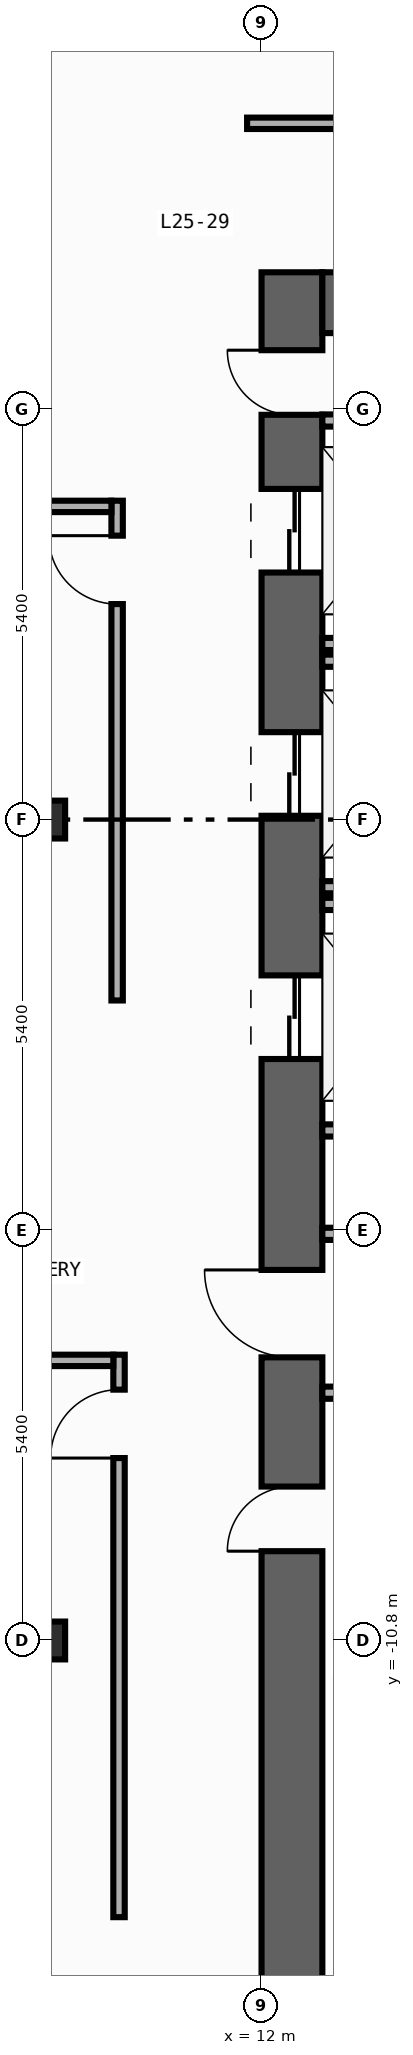
"""IFC4 building model, lengths in metres.
Left out: names, types, materials, properties, quantities, classifications, styles, units other than length and angle.
Written with IfcOpenShell. Run it as: python <this file> out.ifc"""

import sys

from ifc_helpers import new_model, si_unit, direction, frame, frame_2d, origin, origin_2d, place, context, subcontext, project, spatial, rectangle, i_section, extrude, element, fill, save


model = new_model("IFC4")
c1 = context("Model", 3, precision=1e-05, world=origin(), true_north=direction((0.0, 1.0)))
c2 = subcontext(c1, "Body", "Model", "MODEL_VIEW")
j1 = project(units=[si_unit("LENGTHUNIT", "METRE"), si_unit("PLANEANGLEUNIT", "RADIAN")], contexts=[c1])
p1 = place(None, origin())
s1 = spatial("IfcSite", under=j1, at=p1, CompositionType="ELEMENT")
p2 = place(p1, origin())
s2 = spatial("IfcBuilding", under=s1, at=p2, CompositionType="ELEMENT")
p3 = place(p2, frame((0.0, 0.0, 110.0)))
s3 = spatial("IfcBuildingStorey", under=s2, at=p3, CompositionType="ELEMENT", Elevation=110.0)
p4 = place(p3, frame((12.4, -19.8, 0.0), z_axis=(0.0, 0.0, 1.0), x_axis=(0.0, 1.0, 0.0)))
e1 = element("IfcWall", 1, at=p4, inside=s3, PredefinedType="SHEAR", context=c2, shape_type="SweptSolid", body=[
    extrude(rectangle(XDim=27.0, YDim=0.8, at=frame_2d((13.5, 0.0))), origin(), (0.0, 0.0, 1.0), 3.94),
])
p5 = place(p4, frame((23.05, 0.0, 0.0)))
e2 = element("IfcOpeningElement", 2, at=p5, cuts=e1, PredefinedType="OPENING", context=c2, shape_type="SweptSolid", body=[
    extrude(rectangle(XDim=1.1, YDim=2.2, at=frame_2d((0.55, 1.1))), frame((0.0, 0.41, 0.0), z_axis=(0.0, -1.0, 0.0), x_axis=(1.0, 0.0, 0.0)), (0.0, 0.0, 1.0), 0.82),
])
p6 = place(p4, frame((19.85, 0.0, 0.0)))
e3 = element("IfcOpeningElement", 3, at=p6, cuts=e1, PredefinedType="OPENING", context=c2, shape_type="SweptSolid", body=[
    extrude(rectangle(XDim=1.1, YDim=2.2, at=frame_2d((0.55, 1.1))), frame((0.0, 0.41, 0.0), z_axis=(0.0, -1.0, 0.0), x_axis=(1.0, 0.0, 0.0)), (0.0, 0.0, 1.0), 0.82),
])
p7 = place(p4, frame((16.65, 0.0, 0.0)))
e4 = element("IfcOpeningElement", 4, at=p7, cuts=e1, PredefinedType="OPENING", context=c2, shape_type="SweptSolid", body=[
    extrude(rectangle(XDim=1.1, YDim=2.2, at=frame_2d((0.55, 1.1))), frame((0.0, 0.41, 0.0), z_axis=(0.0, -1.0, 0.0), x_axis=(1.0, 0.0, 0.0)), (0.0, 0.0, 1.0), 0.82),
])
p8 = place(p4, frame((10.175, 0.0, 0.0)))
e5 = element("IfcOpeningElement", 5, at=p8, cuts=e1, PredefinedType="OPENING", context=c2, shape_type="SweptSolid", body=[
    extrude(rectangle(XDim=0.85, YDim=2.1, at=frame_2d((0.425, 1.05))), frame((0.0, 0.41, 0.0), z_axis=(0.0, -1.0, 0.0), x_axis=(1.0, 0.0, 0.0)), (0.0, 0.0, 1.0), 0.82),
])
p9 = place(p4, frame((12.725, 0.0, 0.0)))
e6 = element("IfcOpeningElement", 6, at=p9, cuts=e1, PredefinedType="OPENING", context=c2, shape_type="SweptSolid", body=[
    extrude(rectangle(XDim=1.15, YDim=2.2, at=frame_2d((0.575, 1.1))), frame((0.0, 0.41, 0.0), z_axis=(0.0, -1.0, 0.0), x_axis=(1.0, 0.0, 0.0)), (0.0, 0.0, 1.0), 0.82),
])
p10 = place(p4, frame((25.125, 0.0, 0.0)))
e7 = element("IfcOpeningElement", 7, at=p10, cuts=e1, PredefinedType="OPENING", context=c2, shape_type="SweptSolid", body=[
    extrude(rectangle(XDim=0.85, YDim=2.1, at=frame_2d((0.425, 1.05))), frame((0.0, 0.41, 0.0), z_axis=(0.0, -1.0, 0.0), x_axis=(1.0, 0.0, 0.0)), (0.0, 0.0, 1.0), 0.82),
])
p11 = place(p3, frame((12.8, 6.8, 0.0), z_axis=(0.0, 0.0, 1.0), x_axis=(1.0, 0.0, 0.0)))
e8 = element("IfcWall", 8, at=p11, inside=s3, PredefinedType="SHEAR", context=c2, shape_type="SweptSolid", body=[
    extrude(rectangle(XDim=6.8, YDim=0.8, at=frame_2d((3.4, 0.0))), origin(), (0.0, 0.0, 1.0), 3.94),
])
for number, where, z_axis, x_axis in (
    (9, (9.2, -10.8, 0.0), (0.0, 0.0, 1.0), (1.0, 0.0, 0.0)),
    (10, (9.2, 0.0, 0.0), (0.0, 0.0, 1.0), (1.0, 0.0, 0.0)),
):
    element("IfcColumn", number, at=place(p3, frame(where, z_axis=z_axis, x_axis=x_axis)), inside=s3, PredefinedType="COLUMN", context=c2, shape_type="SweptSolid", body=[
        extrude(i_section(OverallWidth=0.432, OverallDepth=0.498, WebThickness=0.045, FlangeThickness=0.07, FilletRadius=0.022, at=origin_2d()), origin(), (0.0, 0.0, 1.0), 4.2),
    ])
for number, where, z_axis, x_axis in (
    (11, (12.8, 2.31, 0.0), (0.0, 0.0, 1.0), (1.0, 0.0, 0.0)),
    (12, (12.8, -0.89, 0.0), (0.0, 0.0, 1.0), (1.0, 0.0, 0.0)),
    (13, (12.8, 2.09, 0.0), (0.0, 0.0, 1.0), (1.0, 0.0, 0.0)),
    (14, (12.8, -4.09, 0.0), (0.0, 0.0, 1.0), (1.0, 0.0, 0.0)),
    (15, (12.8, -1.11, 0.0), (0.0, 0.0, 1.0), (1.0, 0.0, 0.0)),
):
    element("IfcWall", number, at=place(p3, frame(where, z_axis=z_axis, x_axis=x_axis)), inside=s3, PredefinedType="STANDARD", context=c2, shape_type="SweptSolid", body=[
        extrude(rectangle(XDim=2.19, YDim=0.16, at=frame_2d((1.095, 0.0))), origin(), (0.0, 0.0, 1.0), 3.94),
    ])
for number, where, z_axis, x_axis in (
    (16, (12.8, -5.45, 0.0), (0.0, 0.0, 1.0), (1.0, 0.0, 0.0)),
    (17, (12.8, -7.54, 0.0), (0.0, 0.0, 1.0), (1.0, 0.0, 0.0)),
    (18, (12.8, 5.25, 0.0), (0.0, 0.0, 1.0), (1.0, 0.0, 0.0)),
):
    element("IfcWall", number, at=place(p3, frame(where, z_axis=z_axis, x_axis=x_axis)), inside=s3, PredefinedType="STANDARD", context=c2, shape_type="SweptSolid", body=[
        extrude(rectangle(XDim=2.6, YDim=0.16, at=frame_2d((1.3, 0.0))), origin(), (0.0, 0.0, 1.0), 3.94),
    ])
p12 = place(p3, frame((10.1, -2.38, 0.0), z_axis=(0.0, 0.0, 1.0), x_axis=(0.0, 1.0, 0.0)))
e19 = element("IfcWall", 19, at=p12, inside=s3, PredefinedType="PARTITIONING", context=c2, shape_type="SweptSolid", body=[
    extrude(rectangle(XDim=6.575, YDim=0.15, at=frame_2d((3.288, 0.0))), origin(), (0.0, 0.0, 1.0), 3.94),
])
p13 = place(p12, frame((5.215, 0.0, 0.0)))
e20 = element("IfcOpeningElement", 20, at=p13, cuts=e19, PredefinedType="OPENING", context=c2, shape_type="SweptSolid", body=[
    extrude(rectangle(XDim=0.9, YDim=2.15, at=frame_2d((0.45, 1.075))), frame((0.0, 0.085, 0.0), z_axis=(0.0, -1.0, 0.0), x_axis=(1.0, 0.0, 0.0)), (0.0, 0.0, 1.0), 0.17),
])
p14 = place(p3, frame((10.125, -14.44, 0.0), z_axis=(0.0, 0.0, 1.0), x_axis=(0.0, 1.0, 0.0)))
e21 = element("IfcWall", 21, at=p14, inside=s3, PredefinedType="PARTITIONING", context=c2, shape_type="SweptSolid", body=[
    extrude(rectangle(XDim=7.4, YDim=0.15, at=frame_2d((3.7, 0.0))), origin(), (0.0, 0.0, 1.0), 3.94),
])
p15 = place(p14, frame((6.04, 0.0, 0.0)))
e22 = element("IfcOpeningElement", 22, at=p15, cuts=e21, PredefinedType="OPENING", context=c2, shape_type="SweptSolid", body=[
    extrude(rectangle(XDim=0.9, YDim=2.15, at=frame_2d((0.45, 1.075))), frame((0.0, 0.085, 0.0), z_axis=(0.0, -1.0, 0.0), x_axis=(1.0, 0.0, 0.0)), (0.0, 0.0, 1.0), 0.17),
])
p16 = place(p3, frame((3.78, 4.12, 0.0), z_axis=(0.0, 0.0, 1.0), x_axis=(1.0, 0.0, 0.0)))
e23 = element("IfcWall", 23, at=p16, inside=s3, PredefinedType="PARTITIONING", context=c2, shape_type="SweptSolid", body=[
    extrude(rectangle(XDim=6.245, YDim=0.15, at=frame_2d((3.123, 0.0))), origin(), (0.0, 0.0, 1.0), 3.94),
])
p17 = place(p16, frame((0.46, 0.0, 0.0)))
e24 = element("IfcOpeningElement", 24, at=p17, cuts=e23, PredefinedType="OPENING", context=c2, shape_type="SweptSolid", body=[
    extrude(rectangle(XDim=0.9, YDim=2.15, at=frame_2d((0.45, 1.075))), frame((0.0, 0.085, 0.0), z_axis=(0.0, -1.0, 0.0), x_axis=(1.0, 0.0, 0.0)), (0.0, 0.0, 1.0), 0.17),
])
p18 = place(p3, frame((-0.015, -7.115, 0.0), z_axis=(0.0, 0.0, 1.0), x_axis=(1.0, 0.0, 0.0)))
e25 = element("IfcWall", 25, at=p18, inside=s3, PredefinedType="PARTITIONING", context=c2, shape_type="SweptSolid", body=[
    extrude(rectangle(XDim=10.065, YDim=0.15, at=frame_2d((5.032, 0.0))), origin(), (0.0, 0.0, 1.0), 3.94),
])
p19 = place(p18, frame((0.46, 0.0, 0.0)))
e26 = element("IfcOpeningElement", 26, at=p19, cuts=e25, PredefinedType="OPENING", context=c2, shape_type="SweptSolid", body=[
    extrude(rectangle(XDim=0.9, YDim=2.15, at=frame_2d((0.45, 1.075))), frame((0.0, 0.085, 0.0), z_axis=(0.0, -1.0, 0.0), x_axis=(1.0, 0.0, 0.0)), (0.0, 0.0, 1.0), 0.17),
])
p20 = place(p3, frame((11.81, 9.16, 0.0), z_axis=(0.0, 0.0, 1.0), x_axis=(1.0, 0.0, 0.0)))
e27 = element("IfcWall", 27, at=p20, inside=s3, PredefinedType="PARTITIONING", context=c2, shape_type="SweptSolid", body=[
    extrude(rectangle(XDim=8.83, YDim=0.15, at=frame_2d((4.415, 0.0))), origin(), (0.0, 0.0, 1.0), 3.94),
])
p21 = place(p20, frame((5.067, 0.0, 0.0)))
e28 = element("IfcOpeningElement", 28, at=p21, cuts=e27, PredefinedType="OPENING", context=c2, shape_type="SweptSolid", body=[
    extrude(rectangle(XDim=0.9, YDim=2.15, at=frame_2d((0.45, 1.075))), frame((0.0, 0.085, 0.0), z_axis=(0.0, -1.0, 0.0), x_axis=(1.0, 0.0, 0.0)), (0.0, 0.0, 1.0), 0.17),
])
p22 = place(p5, origin())
e29 = element("IfcDoor", 29, at=p22, inside=s3, OperationType="DOUBLE_DOOR_SLIDING", PredefinedType="DOOR", context=c2, shape_type="SweptSolid", body=[
    extrude(rectangle(XDim=1.1, YDim=2.2, at=frame_2d((0.55, 1.1))), frame((0.0, 0.025, 0.0), z_axis=(0.0, -1.0, 0.0), x_axis=(1.0, 0.0, 0.0)), (0.0, 0.0, 1.0), 0.05),
])
fill(e2, e29)
p23 = place(p6, origin())
e30 = element("IfcDoor", 30, at=p23, inside=s3, OperationType="DOUBLE_DOOR_SLIDING", PredefinedType="DOOR", context=c2, shape_type="SweptSolid", body=[
    extrude(rectangle(XDim=1.1, YDim=2.2, at=frame_2d((0.55, 1.1))), frame((0.0, 0.025, 0.0), z_axis=(0.0, -1.0, 0.0), x_axis=(1.0, 0.0, 0.0)), (0.0, 0.0, 1.0), 0.05),
])
fill(e3, e30)
p24 = place(p7, origin())
e31 = element("IfcDoor", 31, at=p24, inside=s3, OperationType="DOUBLE_DOOR_SLIDING", PredefinedType="DOOR", context=c2, shape_type="SweptSolid", body=[
    extrude(rectangle(XDim=1.1, YDim=2.2, at=frame_2d((0.55, 1.1))), frame((0.0, 0.025, 0.0), z_axis=(0.0, -1.0, 0.0), x_axis=(1.0, 0.0, 0.0)), (0.0, 0.0, 1.0), 0.05),
])
fill(e4, e31)
p25 = place(p8, origin())
e32 = element("IfcDoor", 32, at=p25, inside=s3, OperationType="SINGLE_SWING_LEFT", PredefinedType="DOOR", context=c2, shape_type="SweptSolid", body=[
    extrude(rectangle(XDim=0.85, YDim=2.1, at=frame_2d((0.425, 1.05))), frame((0.0, 0.025, 0.0), z_axis=(0.0, -1.0, 0.0), x_axis=(1.0, 0.0, 0.0)), (0.0, 0.0, 1.0), 0.05),
])
fill(e5, e32)
p26 = place(p9, origin())
e33 = element("IfcDoor", 33, at=p26, inside=s3, OperationType="SINGLE_SWING_RIGHT", PredefinedType="DOOR", context=c2, shape_type="SweptSolid", body=[
    extrude(rectangle(XDim=1.15, YDim=2.2, at=frame_2d((0.575, 1.1))), frame((0.0, 0.025, 0.0), z_axis=(0.0, -1.0, 0.0), x_axis=(1.0, 0.0, 0.0)), (0.0, 0.0, 1.0), 0.05),
])
fill(e6, e33)
p27 = place(p10, origin())
e34 = element("IfcDoor", 34, at=p27, inside=s3, OperationType="SINGLE_SWING_RIGHT", PredefinedType="DOOR", context=c2, shape_type="SweptSolid", body=[
    extrude(rectangle(XDim=0.85, YDim=2.1, at=frame_2d((0.425, 1.05))), frame((0.0, 0.025, 0.0), z_axis=(0.0, -1.0, 0.0), x_axis=(1.0, 0.0, 0.0)), (0.0, 0.0, 1.0), 0.05),
])
fill(e7, e34)
p28 = place(p13, origin())
e35 = element("IfcDoor", 35, at=p28, inside=s3, OperationType="SINGLE_SWING_RIGHT", PredefinedType="DOOR", context=c2, shape_type="SweptSolid", body=[
    extrude(rectangle(XDim=0.9, YDim=2.15, at=frame_2d((0.45, 1.075))), frame((0.0, 0.025, 0.0), z_axis=(0.0, -1.0, 0.0), x_axis=(1.0, 0.0, 0.0)), (0.0, 0.0, 1.0), 0.05),
])
fill(e20, e35)
p29 = place(p15, origin())
e36 = element("IfcDoor", 36, at=p29, inside=s3, OperationType="SINGLE_SWING_LEFT", PredefinedType="DOOR", context=c2, shape_type="SweptSolid", body=[
    extrude(rectangle(XDim=0.9, YDim=2.15, at=frame_2d((0.45, 1.075))), frame((0.0, 0.025, 0.0), z_axis=(0.0, -1.0, 0.0), x_axis=(1.0, 0.0, 0.0)), (0.0, 0.0, 1.0), 0.05),
])
fill(e22, e36)
save(model, sys.argv[1])
